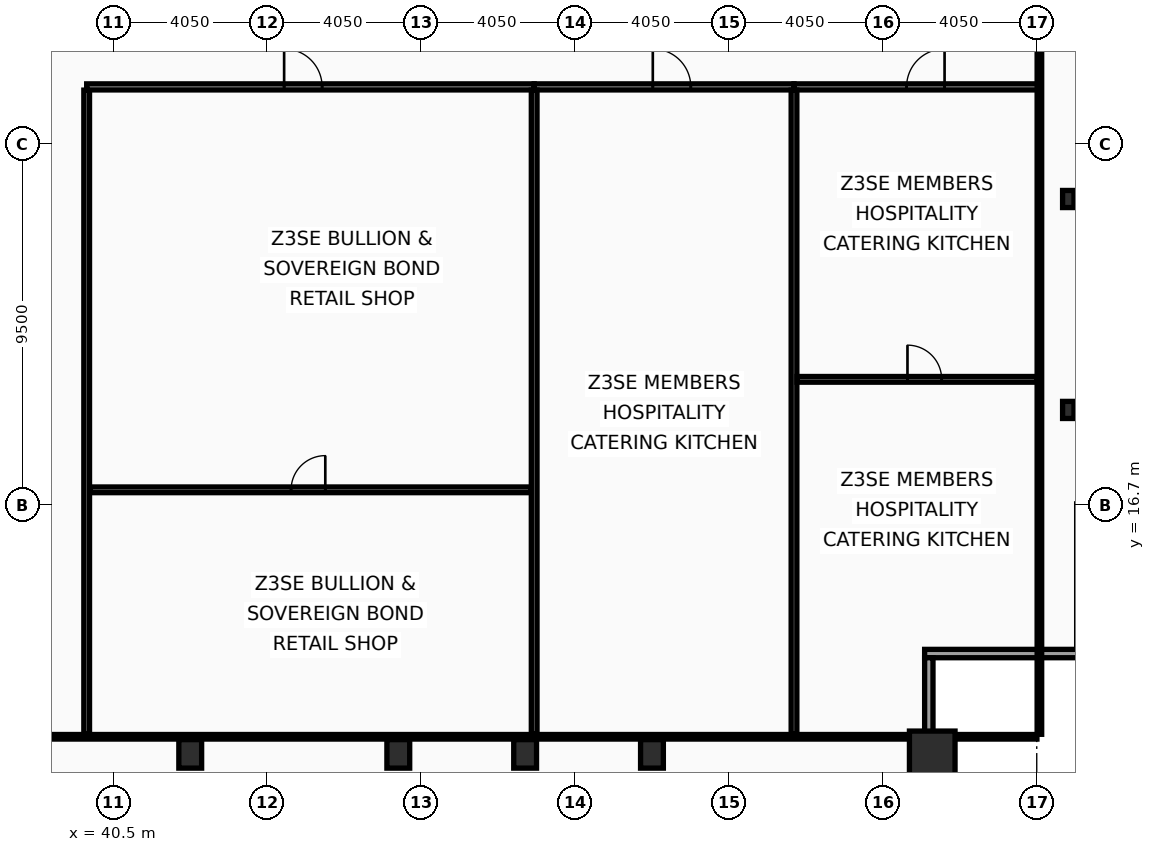
"""IFC4 building model, lengths in metres.
Left out: names, types, materials, properties, quantities, classifications, styles, units other than length and angle.
Written with IfcOpenShell. Run it as: python <this file> out.ifc"""

import sys

from ifc_helpers import new_model, si_unit, direction, frame, frame_2d, origin, origin_2d, place, context, subcontext, project, spatial, rectangle, hollow_rectangle, i_section, extrude, element, fill, save


model = new_model("IFC4")
c1 = context("Model", 3, precision=1e-05, world=origin(), true_north=direction((0.0, 1.0)))
c2 = subcontext(c1, "Body", "Model", "MODEL_VIEW")
j1 = project(units=[si_unit("LENGTHUNIT", "METRE"), si_unit("PLANEANGLEUNIT", "RADIAN")], contexts=[c1])
p1 = place(None, origin())
s1 = spatial("IfcSite", under=j1, at=p1, CompositionType="ELEMENT")
p2 = place(p1, origin())
s2 = spatial("IfcBuilding", under=s1, at=p2, CompositionType="ELEMENT")
p3 = place(p2, frame((0.0, 0.0, 206.6)))
s3 = spatial("IfcBuildingStorey", under=s2, at=p3, CompositionType="ELEMENT", Elevation=206.6)
p4 = place(p3, frame((62.05, 10.15, 0.0), z_axis=(0.0, 0.0, 1.0), x_axis=(1.0, 0.0, 0.0)))
e1 = element("IfcColumn", 1, at=p4, inside=s3, PredefinedType="COLUMN", context=c2, shape_type="SweptSolid", body=[
    extrude(hollow_rectangle(XDim=1.2, YDim=1.2, WallThickness=0.06, at=origin_2d()), origin(), (0.0, 0.0, 1.0), 3.6),
])
for number, where, z_axis, x_axis in (
    (2, (42.525, 10.15, 0.0), (0.0, 0.0, 1.0), (1.0, 0.0, 0.0)),
    (3, (48.0, 10.15, 0.0), (0.0, 0.0, 1.0), (1.0, 0.0, 0.0)),
    (4, (51.337, 10.15, 0.0), (0.0, 0.0, 1.0), (1.0, 0.0, 0.0)),
    (5, (54.675, 10.15, 0.0), (0.0, 0.0, 1.0), (1.0, 0.0, 0.0)),
):
    element("IfcColumn", number, at=place(p3, frame(where, z_axis=z_axis, x_axis=x_axis)), inside=s3, PredefinedType="COLUMN", context=c2, shape_type="SweptSolid", body=[
        extrude(hollow_rectangle(XDim=0.6, YDim=0.75, WallThickness=0.045, at=origin_2d()), origin(), (0.0, 0.0, 1.0), 3.6),
    ])
for number, where, z_axis, x_axis in (
    (6, (65.63, 19.2, 0.0), (0.0, 0.0, 1.0), (1.0, 0.0, 0.0)),
    (7, (65.63, 24.75, 0.0), (0.0, 0.0, 1.0), (1.0, 0.0, 0.0)),
):
    element("IfcColumn", number, at=place(p3, frame(where, z_axis=z_axis, x_axis=x_axis)), inside=s3, PredefinedType="COLUMN", context=c2, shape_type="SweptSolid", body=[
        extrude(i_section(OverallWidth=0.3, OverallDepth=0.45, WebThickness=0.014, FlangeThickness=0.026, at=origin_2d()), origin(), (0.0, 0.0, 1.0), 3.6),
    ])
p5 = place(p3, frame((66.07, 12.79, 0.0), z_axis=(0.0, 0.0, 1.0), x_axis=(-1.0, 0.0, 0.0)))
e8 = element("IfcWall", 8, at=p5, inside=s3, PredefinedType="SOLIDWALL", context=c2, shape_type="SweptSolid", body=[
    extrude(rectangle(XDim=4.22, YDim=0.22, at=frame_2d((2.11, 0.0))), origin(), (0.0, 0.0, 1.0), 2.83),
])
p6 = place(p3, frame((61.96, 12.68, 0.0), z_axis=(0.0, 0.0, 1.0), x_axis=(0.0, -1.0, 0.0)))
e9 = element("IfcWall", 9, at=p6, inside=s3, PredefinedType="SOLIDWALL", context=c2, shape_type="SweptSolid", body=[
    extrude(rectangle(XDim=3.91, YDim=0.22, at=frame_2d((1.955, 0.0))), origin(), (0.0, 0.0, 1.0), 2.83),
])
p7 = place(p3, frame((39.8, 10.665, 0.0), z_axis=(0.0, 0.0, 1.0), x_axis=(0.0, 1.0, 0.0)))
e10 = element("IfcWall", 10, at=p7, inside=s3, PredefinedType="PARTITIONING", context=c2, shape_type="SweptSolid", body=[
    extrude(rectangle(XDim=16.95, YDim=0.15, at=frame_2d((8.475, 0.0))), origin(), (0.0, 0.0, 1.0), 2.98),
])
p8 = place(p3, frame((39.8, 27.7, 0.0), z_axis=(0.0, 0.0, 1.0), x_axis=(1.0, 0.0, 0.0)))
e11 = element("IfcWall", 11, at=p8, inside=s3, PredefinedType="PARTITIONING", context=c2, shape_type="SweptSolid", body=[
    extrude(rectangle(XDim=11.775, YDim=0.16, at=frame_2d((5.888, 0.0))), origin(), (0.0, 0.0, 1.0), 2.73),
])
p9 = place(p8, frame((5.196, 0.0, 0.0)))
e12 = element("IfcOpeningElement", 12, at=p9, cuts=e11, PredefinedType="OPENING", context=c2, shape_type="SweptSolid", body=[
    extrude(rectangle(XDim=1.0, YDim=2.05, at=frame_2d((0.5, 1.025))), frame((0.0, 0.09, 0.0), z_axis=(0.0, -1.0, 0.0), x_axis=(1.0, 0.0, 0.0)), (0.0, 0.0, 1.0), 0.18),
])
p10 = place(p3, frame((39.88, 17.098, 0.0), z_axis=(0.0, 0.0, 1.0), x_axis=(1.0, 0.0, 0.0)))
e13 = element("IfcWall", 13, at=p10, inside=s3, PredefinedType="PARTITIONING", context=c2, shape_type="SweptSolid", body=[
    extrude(rectangle(XDim=11.615, YDim=0.15, at=frame_2d((5.808, 0.0))), origin(), (0.0, 0.0, 1.0), 2.73),
])
p11 = place(p10, frame((5.299, 0.0, 0.0)))
e14 = element("IfcOpeningElement", 14, at=p11, cuts=e13, PredefinedType="OPENING", context=c2, shape_type="SweptSolid", body=[
    extrude(rectangle(XDim=0.9, YDim=2.05, at=frame_2d((0.45, 1.025))), frame((0.0, 0.085, 0.0), z_axis=(0.0, -1.0, 0.0), x_axis=(1.0, 0.0, 0.0)), (0.0, 0.0, 1.0), 0.17),
])
p12 = place(p3, frame((51.575, 27.7, 0.0), z_axis=(0.0, 0.0, 1.0), x_axis=(1.0, 0.0, 0.0)))
e15 = element("IfcWall", 15, at=p12, inside=s3, PredefinedType="PARTITIONING", context=c2, shape_type="SweptSolid", body=[
    extrude(rectangle(XDim=6.837, YDim=0.16, at=frame_2d((3.419, 0.0))), origin(), (0.0, 0.0, 1.0), 2.73),
])
p13 = place(p12, frame((3.122, 0.0, 0.0)))
e16 = element("IfcOpeningElement", 16, at=p13, cuts=e15, PredefinedType="OPENING", context=c2, shape_type="SweptSolid", body=[
    extrude(rectangle(XDim=1.0, YDim=2.05, at=frame_2d((0.5, 1.025))), frame((0.0, 0.09, 0.0), z_axis=(0.0, -1.0, 0.0), x_axis=(1.0, 0.0, 0.0)), (0.0, 0.0, 1.0), 0.18),
])
p14 = place(p3, frame((51.575, 10.665, 0.0), z_axis=(0.0, 0.0, 1.0), x_axis=(0.0, 1.0, 0.0)))
e17 = element("IfcWall", 17, at=p14, inside=s3, PredefinedType="PARTITIONING", context=c2, shape_type="SweptSolid", body=[
    extrude(rectangle(XDim=16.95, YDim=0.15, at=frame_2d((8.475, 0.0))), origin(), (0.0, 0.0, 1.0), 2.98),
])
p15 = place(p3, frame((58.413, 27.7, 0.0), z_axis=(0.0, 0.0, 1.0), x_axis=(1.0, 0.0, 0.0)))
e18 = element("IfcWall", 18, at=p15, inside=s3, PredefinedType="PARTITIONING", context=c2, shape_type="SweptSolid", body=[
    extrude(rectangle(XDim=6.458, YDim=0.16, at=frame_2d((3.229, 0.0))), origin(), (0.0, 0.0, 1.0), 3.44),
])
p16 = place(p15, frame((2.962, 0.0, 0.0)))
e19 = element("IfcOpeningElement", 19, at=p16, cuts=e18, PredefinedType="OPENING", context=c2, shape_type="SweptSolid", body=[
    extrude(rectangle(XDim=1.0, YDim=2.05, at=frame_2d((0.5, 1.025))), frame((0.0, 0.09, 0.0), z_axis=(0.0, -1.0, 0.0), x_axis=(1.0, 0.0, 0.0)), (0.0, 0.0, 1.0), 0.18),
])
p17 = place(p3, frame((58.413, 10.665, 0.0), z_axis=(0.0, 0.0, 1.0), x_axis=(0.0, 1.0, 0.0)))
e20 = element("IfcWall", 20, at=p17, inside=s3, PredefinedType="PARTITIONING", context=c2, shape_type="SweptSolid", body=[
    extrude(rectangle(XDim=16.95, YDim=0.15, at=frame_2d((8.475, 0.0))), origin(), (0.0, 0.0, 1.0), 2.73),
])
p18 = place(p3, frame((58.493, 20.005, 0.0), z_axis=(0.0, 0.0, 1.0), x_axis=(1.0, 0.0, 0.0)))
e21 = element("IfcWall", 21, at=p18, inside=s3, PredefinedType="PARTITIONING", context=c2, shape_type="SweptSolid", body=[
    extrude(rectangle(XDim=6.312, YDim=0.15, at=frame_2d((3.156, 0.0))), origin(), (0.0, 0.0, 1.0), 3.44),
])
p19 = place(p18, frame((2.906, 0.0, 0.0)))
e22 = element("IfcOpeningElement", 22, at=p19, cuts=e21, PredefinedType="OPENING", context=c2, shape_type="SweptSolid", body=[
    extrude(rectangle(XDim=0.9, YDim=2.05, at=frame_2d((0.45, 1.025))), frame((0.0, 0.085, 0.0), z_axis=(0.0, -1.0, 0.0), x_axis=(1.0, 0.0, 0.0)), (0.0, 0.0, 1.0), 0.17),
])
p20 = place(p3, frame((64.87, 10.665, 0.0), z_axis=(0.0, 0.0, 1.0), x_axis=(0.0, 1.0, 0.0)))
e23 = element("IfcWall", 23, at=p20, inside=s3, PredefinedType="PARTITIONING", context=c2, shape_type="SweptSolid", body=[
    extrude(rectangle(XDim=42.11, YDim=0.12, at=frame_2d((21.055, 0.0))), origin(), (0.0, 0.0, 1.0), 2.73),
])
p21 = place(p3, frame((8.095, 10.6, 0.0), z_axis=(0.0, 0.0, 1.0), x_axis=(1.0, 0.0, 0.0)))
e24 = element("IfcWall", 24, at=p21, inside=s3, PredefinedType="PARTITIONING", context=c2, shape_type="SweptSolid", body=[
    extrude(rectangle(XDim=56.71, YDim=0.12, at=frame_2d((28.355, 0.0))), origin(), (0.0, 0.0, 1.0), 2.73),
])
p22 = place(p9, origin())
e25 = element("IfcDoor", 25, at=p22, inside=s3, OperationType="SINGLE_SWING_LEFT", PredefinedType="DOOR", context=c2, shape_type="SweptSolid", body=[
    extrude(rectangle(XDim=1.0, YDim=2.05, at=frame_2d((0.5, 1.025))), frame((0.0, 0.025, 0.0), z_axis=(0.0, -1.0, 0.0), x_axis=(1.0, 0.0, 0.0)), (0.0, 0.0, 1.0), 0.05),
])
fill(e12, e25)
p23 = place(p11, origin())
e26 = element("IfcDoor", 26, at=p23, inside=s3, OperationType="SINGLE_SWING_RIGHT", PredefinedType="DOOR", context=c2, shape_type="SweptSolid", body=[
    extrude(rectangle(XDim=0.9, YDim=2.05, at=frame_2d((0.45, 1.025))), frame((0.0, 0.025, 0.0), z_axis=(0.0, -1.0, 0.0), x_axis=(1.0, 0.0, 0.0)), (0.0, 0.0, 1.0), 0.05),
])
fill(e14, e26)
p24 = place(p13, origin())
e27 = element("IfcDoor", 27, at=p24, inside=s3, OperationType="SINGLE_SWING_LEFT", PredefinedType="DOOR", context=c2, shape_type="SweptSolid", body=[
    extrude(rectangle(XDim=1.0, YDim=2.05, at=frame_2d((0.5, 1.025))), frame((0.0, 0.025, 0.0), z_axis=(0.0, -1.0, 0.0), x_axis=(1.0, 0.0, 0.0)), (0.0, 0.0, 1.0), 0.05),
])
fill(e16, e27)
p25 = place(p16, origin())
e28 = element("IfcDoor", 28, at=p25, inside=s3, OperationType="SINGLE_SWING_RIGHT", PredefinedType="DOOR", context=c2, shape_type="SweptSolid", body=[
    extrude(rectangle(XDim=1.0, YDim=2.05, at=frame_2d((0.5, 1.025))), frame((0.0, 0.025, 0.0), z_axis=(0.0, -1.0, 0.0), x_axis=(1.0, 0.0, 0.0)), (0.0, 0.0, 1.0), 0.05),
])
fill(e19, e28)
p26 = place(p19, origin())
e29 = element("IfcDoor", 29, at=p26, inside=s3, OperationType="SINGLE_SWING_LEFT", PredefinedType="DOOR", context=c2, shape_type="SweptSolid", body=[
    extrude(rectangle(XDim=0.9, YDim=2.05, at=frame_2d((0.45, 1.025))), frame((0.0, 0.025, 0.0), z_axis=(0.0, -1.0, 0.0), x_axis=(1.0, 0.0, 0.0)), (0.0, 0.0, 1.0), 0.05),
])
fill(e22, e29)
save(model, sys.argv[1])
